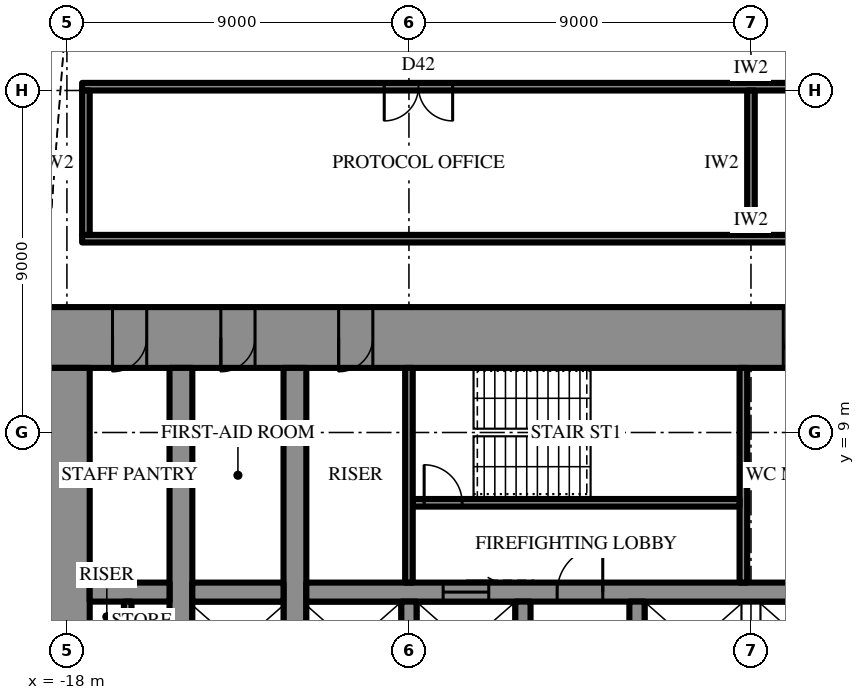
"""IFC4 building model, lengths in metres.
Left out: names, types, materials, properties, quantities, classifications, styles, units other than length and angle.
Written with IfcOpenShell. Run it as: python <this file> out.ifc"""

import sys

from ifc_helpers import new_model, si_unit, direction, frame, frame_2d, origin, place, context, subcontext, project, spatial, rectangle, extrude, element, fill, save


model = new_model("IFC4")
c1 = context("Model", 3, precision=1e-05, world=origin(), true_north=direction((0.0, 1.0)))
c2 = subcontext(c1, "Body", "Model", "MODEL_VIEW")
j1 = project(units=[si_unit("LENGTHUNIT", "METRE"), si_unit("PLANEANGLEUNIT", "RADIAN")], contexts=[c1])
p1 = place(None, origin())
s1 = spatial("IfcSite", under=j1, at=p1, CompositionType="ELEMENT")
p2 = place(p1, origin())
s2 = spatial("IfcBuilding", under=s1, at=p2, CompositionType="ELEMENT")
p3 = place(p2, frame((0.0, 0.0, 186.7)))
s3 = spatial("IfcBuildingStorey", under=s2, at=p3, CompositionType="ELEMENT", Elevation=186.7)
p4 = place(p3, frame((-18.6, 11.5, 0.0), z_axis=(0.0, 0.0, 1.0), x_axis=(1.0, 0.0, 0.0)))
e1 = element("IfcWall", 1, at=p4, inside=s3, PredefinedType="SHEAR", context=c2, shape_type="SweptSolid", body=[
    extrude(rectangle(XDim=37.2, YDim=1.6, at=frame_2d((18.6, 0.0))), origin(), (0.0, 0.0, 1.0), 4.2),
])
p5 = place(p4, frame((19.45, 0.0, 0.0)))
e2 = element("IfcOpeningElement", 2, at=p5, cuts=e1, PredefinedType="OPENING", context=c2, shape_type="SweptSolid", body=[
    extrude(rectangle(XDim=0.9, YDim=2.2, at=frame_2d((0.45, 1.1))), frame((0.0, 0.81, 0.0), z_axis=(0.0, -1.0, 0.0), x_axis=(1.0, 0.0, 0.0)), (0.0, 0.0, 1.0), 1.62),
])
p6 = place(p4, frame((22.45, 0.0, 0.0)))
e3 = element("IfcOpeningElement", 3, at=p6, cuts=e1, PredefinedType="OPENING", context=c2, shape_type="SweptSolid", body=[
    extrude(rectangle(XDim=0.9, YDim=2.2, at=frame_2d((0.45, 1.1))), frame((0.0, 0.81, 0.0), z_axis=(0.0, -1.0, 0.0), x_axis=(1.0, 0.0, 0.0)), (0.0, 0.0, 1.0), 1.62),
])
p7 = place(p4, frame((25.5, 0.0, 0.0)))
e4 = element("IfcOpeningElement", 4, at=p7, cuts=e1, PredefinedType="OPENING", context=c2, shape_type="SweptSolid", body=[
    extrude(rectangle(XDim=1.0, YDim=2.2, at=frame_2d((0.5, 1.1))), frame((0.0, 0.81, 0.0), z_axis=(0.0, -1.0, 0.0), x_axis=(1.0, 0.0, 0.0)), (0.0, 0.0, 1.0), 1.62),
])
p8 = place(p4, frame((1.8, 0.0, 0.0)))
e5 = element("IfcOpeningElement", 5, at=p8, cuts=e1, PredefinedType="OPENING", context=c2, shape_type="SweptSolid", body=[
    extrude(rectangle(XDim=0.9, YDim=2.2, at=frame_2d((0.45, 1.1))), frame((0.0, 0.81, 0.0), z_axis=(0.0, -1.0, 0.0), x_axis=(1.0, 0.0, 0.0)), (0.0, 0.0, 1.0), 1.62),
])
p9 = place(p4, frame((4.65, 0.0, 0.0)))
e6 = element("IfcOpeningElement", 6, at=p9, cuts=e1, PredefinedType="OPENING", context=c2, shape_type="SweptSolid", body=[
    extrude(rectangle(XDim=0.9, YDim=2.2, at=frame_2d((0.45, 1.1))), frame((0.0, 0.81, 0.0), z_axis=(0.0, -1.0, 0.0), x_axis=(1.0, 0.0, 0.0)), (0.0, 0.0, 1.0), 1.62),
])
p10 = place(p4, frame((7.75, 0.0, 0.0)))
e7 = element("IfcOpeningElement", 7, at=p10, cuts=e1, PredefinedType="OPENING", context=c2, shape_type="SweptSolid", body=[
    extrude(rectangle(XDim=0.9, YDim=2.2, at=frame_2d((0.45, 1.1))), frame((0.0, 0.81, 0.0), z_axis=(0.0, -1.0, 0.0), x_axis=(1.0, 0.0, 0.0)), (0.0, 0.0, 1.0), 1.62),
])
p11 = place(p4, frame((28.55, 0.0, 0.0)))
e8 = element("IfcOpeningElement", 8, at=p11, cuts=e1, PredefinedType="OPENING", context=c2, shape_type="SweptSolid", body=[
    extrude(rectangle(XDim=0.9, YDim=2.2, at=frame_2d((0.45, 1.1))), frame((0.0, 0.81, 0.0), z_axis=(0.0, -1.0, 0.0), x_axis=(1.0, 0.0, 0.0)), (0.0, 0.0, 1.0), 1.62),
])
p12 = place(p4, frame((31.65, 0.0, 0.0)))
e9 = element("IfcOpeningElement", 9, at=p12, cuts=e1, PredefinedType="OPENING", context=c2, shape_type="SweptSolid", body=[
    extrude(rectangle(XDim=0.9, YDim=2.2, at=frame_2d((0.45, 1.1))), frame((0.0, 0.81, 0.0), z_axis=(0.0, -1.0, 0.0), x_axis=(1.0, 0.0, 0.0)), (0.0, 0.0, 1.0), 1.62),
])
p13 = place(p4, frame((34.5, 0.0, 0.0)))
e10 = element("IfcOpeningElement", 10, at=p13, cuts=e1, PredefinedType="OPENING", context=c2, shape_type="SweptSolid", body=[
    extrude(rectangle(XDim=0.9, YDim=2.2, at=frame_2d((0.45, 1.1))), frame((0.0, 0.81, 0.0), z_axis=(0.0, -1.0, 0.0), x_axis=(1.0, 0.0, 0.0)), (0.0, 0.0, 1.0), 1.62),
])
p14 = place(p3, frame((-18.0, 10.7, 0.0), z_axis=(0.0, 0.0, 1.0), x_axis=(0.0, -1.0, 0.0)))
e11 = element("IfcWall", 11, at=p14, inside=s3, PredefinedType="SHEAR", context=c2, shape_type="SweptSolid", body=[
    extrude(rectangle(XDim=21.4, YDim=1.2, at=frame_2d((10.7, 0.0))), origin(), (0.0, 0.0, 1.0), 4.2),
])
p15 = place(p14, frame((9.8, 0.0, 0.0)))
e12 = element("IfcOpeningElement", 12, at=p15, cuts=e11, PredefinedType="OPENING", context=c2, shape_type="SweptSolid", body=[
    extrude(rectangle(XDim=1.8, YDim=2.4, at=frame_2d((0.9, 1.2))), frame((0.0, 0.61, 0.0), z_axis=(0.0, -1.0, 0.0), x_axis=(1.0, 0.0, 0.0)), (0.0, 0.0, 1.0), 1.22),
])
p16 = place(p3, frame((-12.0, -10.7, 0.0), z_axis=(0.0, 0.0, 1.0), x_axis=(0.0, 1.0, 0.0)))
e13 = element("IfcWall", 13, at=p16, inside=s3, PredefinedType="SHEAR", context=c2, shape_type="SweptSolid", body=[
    extrude(rectangle(XDim=21.4, YDim=0.6, at=frame_2d((10.7, 0.0))), origin(), (0.0, 0.0, 1.0), 4.2),
])
p17 = place(p16, frame((9.8, 0.0, 0.0)))
e14 = element("IfcOpeningElement", 14, at=p17, cuts=e13, PredefinedType="OPENING", context=c2, shape_type="SweptSolid", body=[
    extrude(rectangle(XDim=1.8, YDim=2.4, at=frame_2d((0.9, 1.2))), frame((0.0, 0.31, 0.0), z_axis=(0.0, -1.0, 0.0), x_axis=(1.0, 0.0, 0.0)), (0.0, 0.0, 1.0), 0.62),
])
p18 = place(p3, frame((-15.0, -10.7, 0.0), z_axis=(0.0, 0.0, 1.0), x_axis=(0.0, 1.0, 0.0)))
e15 = element("IfcWall", 15, at=p18, inside=s3, PredefinedType="SHEAR", context=c2, shape_type="SweptSolid", body=[
    extrude(rectangle(XDim=21.4, YDim=0.6, at=frame_2d((10.7, 0.0))), origin(), (0.0, 0.0, 1.0), 4.2),
])
p19 = place(p18, frame((9.8, 0.0, 0.0)))
e16 = element("IfcOpeningElement", 16, at=p19, cuts=e15, PredefinedType="OPENING", context=c2, shape_type="SweptSolid", body=[
    extrude(rectangle(XDim=1.8, YDim=2.4, at=frame_2d((0.9, 1.2))), frame((0.0, 0.31, 0.0), z_axis=(0.0, -1.0, 0.0), x_axis=(1.0, 0.0, 0.0)), (0.0, 0.0, 1.0), 0.62),
])
p20 = place(p3, frame((-17.4, 4.8, 0.0), z_axis=(0.0, 0.0, 1.0), x_axis=(1.0, 0.0, 0.0)))
e17 = element("IfcWall", 17, at=p20, inside=s3, PredefinedType="SHEAR", context=c2, shape_type="SweptSolid", body=[
    extrude(rectangle(XDim=2.1, YDim=0.5, at=frame_2d((1.05, 0.0))), origin(), (0.0, 0.0, 1.0), 4.2),
])
p21 = place(p3, frame((-14.7, 4.8, 0.0), z_axis=(0.0, 0.0, 1.0), x_axis=(1.0, 0.0, 0.0)))
e18 = element("IfcWall", 18, at=p21, inside=s3, PredefinedType="SHEAR", context=c2, shape_type="SweptSolid", body=[
    extrude(rectangle(XDim=2.4, YDim=0.5, at=frame_2d((1.2, 0.0))), origin(), (0.0, 0.0, 1.0), 4.2),
])
p22 = place(p3, frame((-11.7, 4.8, 0.0), z_axis=(0.0, 0.0, 1.0), x_axis=(1.0, 0.0, 0.0)))
e19 = element("IfcWall", 19, at=p22, inside=s3, PredefinedType="SHEAR", context=c2, shape_type="SweptSolid", body=[
    extrude(rectangle(XDim=23.4, YDim=0.5, at=frame_2d((11.7, 0.0))), origin(), (0.0, 0.0, 1.0), 4.2),
])
p23 = place(p22, frame((6.6, 0.0, 0.0)))
e20 = element("IfcOpeningElement", 20, at=p23, cuts=e19, PredefinedType="OPENING", context=c2, shape_type="SweptSolid", body=[
    extrude(rectangle(XDim=1.2, YDim=2.2, at=frame_2d((0.6, 1.1))), frame((0.0, 0.26, 0.0), z_axis=(0.0, -1.0, 0.0), x_axis=(1.0, 0.0, 0.0)), (0.0, 0.0, 1.0), 0.52),
])
p24 = place(p22, frame((3.6, 0.0, 0.0)))
e21 = element("IfcOpeningElement", 21, at=p24, cuts=e19, PredefinedType="OPENING", context=c2, shape_type="SweptSolid", body=[
    extrude(rectangle(XDim=1.2, YDim=2.2, at=frame_2d((0.6, 1.1))), frame((0.0, 0.26, 0.0), z_axis=(0.0, -1.0, 0.0), x_axis=(1.0, 0.0, 0.0)), (0.0, 0.0, 1.0), 0.52),
])
for number, where, z_axis, x_axis in (
    (22, (-9.0, 2.25, 0.0), (0.0, 0.0, 1.0), (0.0, 1.0, 0.0)),
    (23, (-6.0, 2.25, 0.0), (0.0, 0.0, 1.0), (0.0, 1.0, 0.0)),
    (24, (-3.0, 2.25, 0.0), (0.0, 0.0, 1.0), (0.0, 1.0, 0.0)),
):
    element("IfcWall", number, at=place(p3, frame(where, z_axis=z_axis, x_axis=x_axis)), inside=s3, PredefinedType="SHEAR", context=c2, shape_type="SweptSolid", body=[
        extrude(rectangle(XDim=2.3, YDim=0.4, at=frame_2d((1.15, 0.0))), origin(), (0.0, 0.0, 1.0), 4.2),
    ])
p25 = place(p3, frame((-0.2, 5.05, 0.0), z_axis=(0.0, 0.0, 1.0), x_axis=(0.0, 1.0, 0.0)))
e25 = element("IfcWall", 25, at=p25, inside=s3, PredefinedType="SHEAR", context=c2, shape_type="SweptSolid", body=[
    extrude(rectangle(XDim=5.65, YDim=0.2, at=frame_2d((2.825, 0.0))), origin(), (0.0, 0.0, 1.0), 4.2),
])
p26 = place(p3, frame((-8.9, 7.15, 0.0), z_axis=(0.0, 0.0, 1.0), x_axis=(1.0, 0.0, 0.0)))
e26 = element("IfcWall", 26, at=p26, inside=s3, PredefinedType="SHEAR", context=c2, shape_type="SweptSolid", body=[
    extrude(rectangle(XDim=8.6, YDim=0.2, at=frame_2d((4.3, 0.0))), origin(), (0.0, 0.0, 1.0), 4.2),
])
p27 = place(p26, frame((0.3, 0.0, 0.0)))
e27 = element("IfcOpeningElement", 27, at=p27, cuts=e26, PredefinedType="OPENING", context=c2, shape_type="SweptSolid", body=[
    extrude(rectangle(XDim=1.0, YDim=2.2, at=frame_2d((0.5, 1.1))), frame((0.0, 0.11, 0.0), z_axis=(0.0, -1.0, 0.0), x_axis=(1.0, 0.0, 0.0)), (0.0, 0.0, 1.0), 0.22),
])
p28 = place(p3, frame((-9.0, 5.05, 0.0), z_axis=(0.0, 0.0, 1.0), x_axis=(0.0, 1.0, 0.0)))
e28 = element("IfcWall", 28, at=p28, inside=s3, PredefinedType="PARTITIONING", context=c2, shape_type="SweptSolid", body=[
    extrude(rectangle(XDim=5.65, YDim=0.2, at=frame_2d((2.825, 0.0))), origin(), (0.0, 0.0, 1.0), 4.0),
])
p29 = place(p3, frame((-16.4, 3.55, 0.0), z_axis=(0.0, 0.0, 1.0), x_axis=(0.0, 1.0, 0.0)))
e29 = element("IfcWall", 29, at=p29, inside=s3, PredefinedType="PARTITIONING", context=c2, shape_type="SweptSolid", body=[
    extrude(rectangle(XDim=1.0, YDim=0.2, at=frame_2d((0.5, 0.0))), origin(), (0.0, 0.0, 1.0), 4.0),
])
p30 = place(p3, frame((-17.6, 14.1, 0.0), z_axis=(0.0, 0.0, 1.0), x_axis=(1.0, 0.0, 0.0)))
e30 = element("IfcWall", 30, at=p30, inside=s3, PredefinedType="PARTITIONING", context=c2, shape_type="SweptSolid", body=[
    extrude(rectangle(XDim=35.2, YDim=0.2, at=frame_2d((17.6, 0.0))), origin(), (0.0, 0.0, 1.0), 4.0),
])
p31 = place(p3, frame((-17.6, 18.1, 0.0), z_axis=(0.0, 0.0, 1.0), x_axis=(1.0, 0.0, 0.0)))
e31 = element("IfcWall", 31, at=p31, inside=s3, PredefinedType="PARTITIONING", context=c2, shape_type="SweptSolid", body=[
    extrude(rectangle(XDim=35.2, YDim=0.2, at=frame_2d((17.6, 0.0))), origin(), (0.0, 0.0, 1.0), 4.0),
])
p32 = place(p31, frame((7.95, 0.0, 0.0)))
e32 = element("IfcOpeningElement", 32, at=p32, cuts=e31, PredefinedType="OPENING", context=c2, shape_type="SweptSolid", body=[
    extrude(rectangle(XDim=1.8, YDim=2.4, at=frame_2d((0.9, 1.2))), frame((0.0, 0.11, 0.0), z_axis=(0.0, -1.0, 0.0), x_axis=(1.0, 0.0, 0.0)), (0.0, 0.0, 1.0), 0.22),
])
p33 = place(p31, frame((25.45, 0.0, 0.0)))
e33 = element("IfcOpeningElement", 33, at=p33, cuts=e31, PredefinedType="OPENING", context=c2, shape_type="SweptSolid", body=[
    extrude(rectangle(XDim=1.8, YDim=2.4, at=frame_2d((0.9, 1.2))), frame((0.0, 0.11, 0.0), z_axis=(0.0, -1.0, 0.0), x_axis=(1.0, 0.0, 0.0)), (0.0, 0.0, 1.0), 0.22),
])
p34 = place(p3, frame((-17.5, 14.2, 0.0), z_axis=(0.0, 0.0, 1.0), x_axis=(0.0, 1.0, 0.0)))
e34 = element("IfcWall", 34, at=p34, inside=s3, PredefinedType="PARTITIONING", context=c2, shape_type="SweptSolid", body=[
    extrude(rectangle(XDim=3.8, YDim=0.2, at=frame_2d((1.9, 0.0))), origin(), (0.0, 0.0, 1.0), 4.0),
])
p35 = place(p3, frame((0.0, 14.2, 0.0), z_axis=(0.0, 0.0, 1.0), x_axis=(0.0, 1.0, 0.0)))
e35 = element("IfcWall", 35, at=p35, inside=s3, PredefinedType="PARTITIONING", context=c2, shape_type="SweptSolid", body=[
    extrude(rectangle(XDim=3.8, YDim=0.2, at=frame_2d((1.9, 0.0))), origin(), (0.0, 0.0, 1.0), 2.992),
])
p36 = place(p23, origin())
e36 = element("IfcDoor", 36, at=p36, inside=s3, OperationType="SINGLE_SWING_LEFT", PredefinedType="DOOR", context=c2, shape_type="SweptSolid", body=[
    extrude(rectangle(XDim=1.2, YDim=2.2, at=frame_2d((0.6, 1.1))), frame((0.0, 0.025, 0.0), z_axis=(0.0, -1.0, 0.0), x_axis=(1.0, 0.0, 0.0)), (0.0, 0.0, 1.0), 0.05),
])
fill(e20, e36)
p37 = place(p27, origin())
e37 = element("IfcDoor", 37, at=p37, inside=s3, OperationType="SINGLE_SWING_RIGHT", PredefinedType="DOOR", context=c2, shape_type="SweptSolid", body=[
    extrude(rectangle(XDim=1.0, YDim=2.2, at=frame_2d((0.5, 1.1))), frame((0.0, 0.025, 0.0), z_axis=(0.0, -1.0, 0.0), x_axis=(1.0, 0.0, 0.0)), (0.0, 0.0, 1.0), 0.05),
])
fill(e27, e37)
p38 = place(p5, frame((0.9, 0.0, 0.0), z_axis=(0.0, 0.0, 1.0), x_axis=(-1.0, 0.0, 0.0)))
e38 = element("IfcDoor", 38, at=p38, inside=s3, OperationType="SINGLE_SWING_RIGHT", PredefinedType="DOOR", context=c2, shape_type="SweptSolid", body=[
    extrude(rectangle(XDim=0.9, YDim=2.2, at=frame_2d((0.45, 1.1))), frame((0.0, 0.025, 0.0), z_axis=(0.0, -1.0, 0.0), x_axis=(1.0, 0.0, 0.0)), (0.0, 0.0, 1.0), 0.05),
])
fill(e2, e38)
p39 = place(p8, frame((0.9, 0.0, 0.0), z_axis=(0.0, 0.0, 1.0), x_axis=(-1.0, 0.0, 0.0)))
e39 = element("IfcDoor", 39, at=p39, inside=s3, OperationType="SINGLE_SWING_LEFT", PredefinedType="DOOR", context=c2, shape_type="SweptSolid", body=[
    extrude(rectangle(XDim=0.9, YDim=2.2, at=frame_2d((0.45, 1.1))), frame((0.0, 0.025, 0.0), z_axis=(0.0, -1.0, 0.0), x_axis=(1.0, 0.0, 0.0)), (0.0, 0.0, 1.0), 0.05),
])
fill(e5, e39)
p40 = place(p9, frame((0.9, 0.0, 0.0), z_axis=(0.0, 0.0, 1.0), x_axis=(-1.0, 0.0, 0.0)))
e40 = element("IfcDoor", 40, at=p40, inside=s3, OperationType="SINGLE_SWING_LEFT", PredefinedType="DOOR", context=c2, shape_type="SweptSolid", body=[
    extrude(rectangle(XDim=0.9, YDim=2.2, at=frame_2d((0.45, 1.1))), frame((0.0, 0.025, 0.0), z_axis=(0.0, -1.0, 0.0), x_axis=(1.0, 0.0, 0.0)), (0.0, 0.0, 1.0), 0.05),
])
fill(e6, e40)
p41 = place(p10, frame((0.9, 0.0, 0.0), z_axis=(0.0, 0.0, 1.0), x_axis=(-1.0, 0.0, 0.0)))
e41 = element("IfcDoor", 41, at=p41, inside=s3, OperationType="SINGLE_SWING_LEFT", PredefinedType="DOOR", context=c2, shape_type="SweptSolid", body=[
    extrude(rectangle(XDim=0.9, YDim=2.2, at=frame_2d((0.45, 1.1))), frame((0.0, 0.025, 0.0), z_axis=(0.0, -1.0, 0.0), x_axis=(1.0, 0.0, 0.0)), (0.0, 0.0, 1.0), 0.05),
])
fill(e7, e41)
p42 = place(p24, origin())
e42 = element("IfcDoor", 42, at=p42, inside=s3, OperationType="SLIDING_TO_LEFT", PredefinedType="DOOR", context=c2, shape_type="SweptSolid", body=[
    extrude(rectangle(XDim=1.2, YDim=2.2, at=frame_2d((0.6, 1.1))), frame((0.0, 0.025, 0.0), z_axis=(0.0, -1.0, 0.0), x_axis=(1.0, 0.0, 0.0)), (0.0, 0.0, 1.0), 0.05),
])
fill(e21, e42)
p43 = place(p32, frame((1.8, 0.0, 0.0), z_axis=(0.0, 0.0, 1.0), x_axis=(-1.0, 0.0, 0.0)))
e43 = element("IfcDoor", 43, at=p43, inside=s3, OperationType="DOUBLE_DOOR_SINGLE_SWING", PredefinedType="DOOR", context=c2, shape_type="SweptSolid", body=[
    extrude(rectangle(XDim=1.8, YDim=2.4, at=frame_2d((0.9, 1.2))), frame((0.0, 0.025, 0.0), z_axis=(0.0, -1.0, 0.0), x_axis=(1.0, 0.0, 0.0)), (0.0, 0.0, 1.0), 0.05),
])
fill(e32, e43)
save(model, sys.argv[1])
